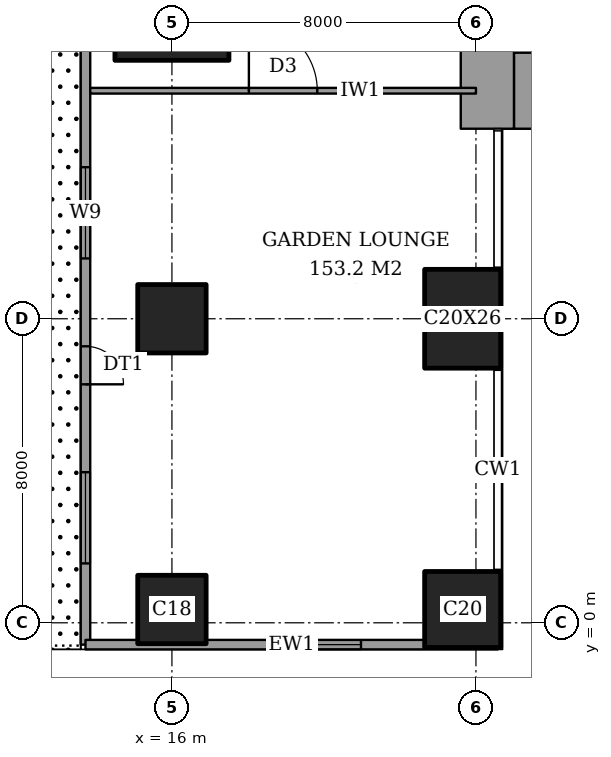
"""IFC4 building model, lengths in metres.
Left out: names, types, materials, properties, quantities, classifications, styles, units other than length and angle.
Written with IfcOpenShell. Run it as: python <this file> out.ifc"""

import sys

from ifc_helpers import new_model, si_unit, direction, frame, frame_2d, origin, origin_2d, place, context, subcontext, project, spatial, rectangle, extrude, element, fill, save


model = new_model("IFC4")
c1 = context("Model", 3, precision=1e-05, world=origin(), true_north=direction((0.0, 1.0)))
c2 = subcontext(c1, "Body", "Model", "MODEL_VIEW")
j1 = project(units=[si_unit("LENGTHUNIT", "METRE"), si_unit("PLANEANGLEUNIT", "RADIAN")], contexts=[c1])
p1 = place(None, origin())
s1 = spatial("IfcSite", under=j1, at=p1, CompositionType="ELEMENT")
p2 = place(p1, origin())
s2 = spatial("IfcBuilding", under=s1, at=p2, CompositionType="ELEMENT")
p3 = place(p2, frame((0.0, 0.0, 221.8)))
s3 = spatial("IfcBuildingStorey", under=s2, at=p3, CompositionType="ELEMENT", Elevation=221.8)
for number, where, z_axis, x_axis in (
    (1, (16.0, 0.35, 0.0), (0.0, 0.0, 1.0), (1.0, 0.0, 0.0)),
    (2, (16.0, 8.0, 0.0), (0.0, 0.0, 1.0), (1.0, 0.0, 0.0)),
):
    element("IfcColumn", number, at=place(p3, frame(where, z_axis=z_axis, x_axis=x_axis)), inside=s3, PredefinedType="COLUMN", context=c2, shape_type="SweptSolid", body=[
        extrude(rectangle(XDim=1.8, YDim=1.8, at=origin_2d()), origin(), (0.0, 0.0, 1.0), 3.6),
    ])
p4 = place(p3, frame((16.0, 16.0, 0.0), z_axis=(0.0, 0.0, 1.0), x_axis=(1.0, 0.0, 0.0)))
e3 = element("IfcColumn", 3, at=p4, inside=s3, PredefinedType="COLUMN", context=c2, shape_type="SweptSolid", body=[
    extrude(rectangle(XDim=3.0, YDim=2.4, at=origin_2d()), origin(), (0.0, 0.0, 1.0), 3.6),
])
p5 = place(p3, frame((23.65, 0.35, 0.0), z_axis=(0.0, 0.0, 1.0), x_axis=(1.0, 0.0, 0.0)))
e4 = element("IfcColumn", 4, at=p5, inside=s3, PredefinedType="COLUMN", context=c2, shape_type="SweptSolid", body=[
    extrude(rectangle(XDim=2.0, YDim=2.0, at=origin_2d()), origin(), (0.0, 0.0, 1.0), 3.6),
])
p6 = place(p3, frame((23.65, 8.0, 0.0), z_axis=(0.0, 0.0, 1.0), x_axis=(1.0, 0.0, 0.0)))
e5 = element("IfcColumn", 5, at=p6, inside=s3, PredefinedType="COLUMN", context=c2, shape_type="SweptSolid", body=[
    extrude(rectangle(XDim=2.0, YDim=2.6, at=origin_2d()), origin(), (0.0, 0.0, 1.0), 3.6),
])
p7 = place(p3, frame((25.0, 14.0, 0.0), z_axis=(0.0, 0.0, 1.0), x_axis=(1.0, 0.0, 0.0)))
e6 = element("IfcWall", 6, at=p7, inside=s3, PredefinedType="SHEAR", context=c2, shape_type="SweptSolid", body=[
    extrude(rectangle(XDim=3.15, YDim=2.0, at=frame_2d((1.575, 0.0))), origin(), (0.0, 0.0, 1.0), 3.6),
])
p8 = place(p3, frame((24.3, 13.0, 0.0), z_axis=(0.0, 0.0, 1.0), x_axis=(0.0, 1.0, 0.0)))
e7 = element("IfcWall", 7, at=p8, inside=s3, PredefinedType="SHEAR", context=c2, shape_type="SweptSolid", body=[
    extrude(rectangle(XDim=10.15, YDim=1.4, at=frame_2d((5.075, 0.0))), origin(), (0.0, 0.0, 1.0), 3.6),
])
p9 = place(p3, frame((13.725, 48.575, 0.0), z_axis=(0.0, 0.0, 1.0), x_axis=(0.0, -1.0, 0.0)))
e8 = element("IfcWall", 8, at=p9, inside=s3, PredefinedType="SOLIDWALL", context=c2, shape_type="SweptSolid", body=[
    extrude(rectangle(XDim=49.15, YDim=0.25, at=frame_2d((24.575, 0.0))), origin(), (0.0, 0.0, 1.0), 3.6),
])
p10 = place(p9, frame((7.85, 0.0, 0.0)))
e9 = element("IfcOpeningElement", 9, at=p10, cuts=e8, PredefinedType="OPENING", context=c2, shape_type="SweptSolid", body=[
    extrude(rectangle(XDim=1.0, YDim=2.4, at=frame_2d((0.5, 1.2))), frame((0.0, 0.135, 0.0), z_axis=(0.0, -1.0, 0.0), x_axis=(1.0, 0.0, 0.0)), (0.0, 0.0, 1.0), 0.27),
])
p11 = place(p9, frame((0.931, 0.0, 0.2)))
e10 = element("IfcOpeningElement", 10, at=p11, cuts=e8, PredefinedType="OPENING", context=c2, shape_type="SweptSolid", body=[
    extrude(rectangle(XDim=2.4, YDim=2.4, at=frame_2d((1.2, 1.2))), frame((0.0, 0.135, 0.0), z_axis=(0.0, -1.0, 0.0), x_axis=(1.0, 0.0, 0.0)), (0.0, 0.0, 1.0), 0.27),
])
p12 = place(p9, frame((4.344, 0.0, 0.2)))
e11 = element("IfcOpeningElement", 11, at=p12, cuts=e8, PredefinedType="OPENING", context=c2, shape_type="SweptSolid", body=[
    extrude(rectangle(XDim=2.4, YDim=2.4, at=frame_2d((1.2, 1.2))), frame((0.0, 0.135, 0.0), z_axis=(0.0, -1.0, 0.0), x_axis=(1.0, 0.0, 0.0)), (0.0, 0.0, 1.0), 0.27),
])
p13 = place(p9, frame((10.663, 0.0, 0.2)))
e12 = element("IfcOpeningElement", 12, at=p13, cuts=e8, PredefinedType="OPENING", context=c2, shape_type="SweptSolid", body=[
    extrude(rectangle(XDim=2.4, YDim=2.4, at=frame_2d((1.2, 1.2))), frame((0.0, 0.135, 0.0), z_axis=(0.0, -1.0, 0.0), x_axis=(1.0, 0.0, 0.0)), (0.0, 0.0, 1.0), 0.27),
])
p14 = place(p9, frame((16.375, 0.0, 0.2)))
e13 = element("IfcOpeningElement", 13, at=p14, cuts=e8, PredefinedType="OPENING", context=c2, shape_type="SweptSolid", body=[
    extrude(rectangle(XDim=2.4, YDim=2.4, at=frame_2d((1.2, 1.2))), frame((0.0, 0.135, 0.0), z_axis=(0.0, -1.0, 0.0), x_axis=(1.0, 0.0, 0.0)), (0.0, 0.0, 1.0), 0.27),
])
p15 = place(p9, frame((20.975, 0.0, 0.2)))
e14 = element("IfcOpeningElement", 14, at=p15, cuts=e8, PredefinedType="OPENING", context=c2, shape_type="SweptSolid", body=[
    extrude(rectangle(XDim=1.2, YDim=2.4, at=frame_2d((0.6, 1.2))), frame((0.0, 0.135, 0.0), z_axis=(0.0, -1.0, 0.0), x_axis=(1.0, 0.0, 0.0)), (0.0, 0.0, 1.0), 0.27),
])
p16 = place(p9, frame((22.975, 0.0, 0.2)))
e15 = element("IfcOpeningElement", 15, at=p16, cuts=e8, PredefinedType="OPENING", context=c2, shape_type="SweptSolid", body=[
    extrude(rectangle(XDim=1.2, YDim=2.4, at=frame_2d((0.6, 1.2))), frame((0.0, 0.135, 0.0), z_axis=(0.0, -1.0, 0.0), x_axis=(1.0, 0.0, 0.0)), (0.0, 0.0, 1.0), 0.27),
])
p17 = place(p9, frame((25.375, 0.0, 0.2)))
e16 = element("IfcOpeningElement", 16, at=p17, cuts=e8, PredefinedType="OPENING", context=c2, shape_type="SweptSolid", body=[
    extrude(rectangle(XDim=2.4, YDim=2.4, at=frame_2d((1.2, 1.2))), frame((0.0, 0.135, 0.0), z_axis=(0.0, -1.0, 0.0), x_axis=(1.0, 0.0, 0.0)), (0.0, 0.0, 1.0), 0.27),
])
p18 = place(p9, frame((30.375, 0.0, 0.2)))
e17 = element("IfcOpeningElement", 17, at=p18, cuts=e8, PredefinedType="OPENING", context=c2, shape_type="SweptSolid", body=[
    extrude(rectangle(XDim=2.4, YDim=2.4, at=frame_2d((1.2, 1.2))), frame((0.0, 0.135, 0.0), z_axis=(0.0, -1.0, 0.0), x_axis=(1.0, 0.0, 0.0)), (0.0, 0.0, 1.0), 0.27),
])
p19 = place(p9, frame((41.3, 0.0, 0.0)))
e18 = element("IfcOpeningElement", 18, at=p19, cuts=e8, PredefinedType="OPENING", context=c2, shape_type="SweptSolid", body=[
    extrude(rectangle(XDim=1.0, YDim=2.4, at=frame_2d((0.5, 1.2))), frame((0.0, 0.135, 0.0), z_axis=(0.0, -1.0, 0.0), x_axis=(1.0, 0.0, 0.0)), (0.0, 0.0, 1.0), 0.27),
])
p20 = place(p9, frame((36.587, 0.0, 0.2)))
e19 = element("IfcOpeningElement", 19, at=p20, cuts=e8, PredefinedType="OPENING", context=c2, shape_type="SweptSolid", body=[
    extrude(rectangle(XDim=2.4, YDim=2.4, at=frame_2d((1.2, 1.2))), frame((0.0, 0.135, 0.0), z_axis=(0.0, -1.0, 0.0), x_axis=(1.0, 0.0, 0.0)), (0.0, 0.0, 1.0), 0.27),
])
p21 = place(p9, frame((44.613, 0.0, 0.2)))
e20 = element("IfcOpeningElement", 20, at=p21, cuts=e8, PredefinedType="OPENING", context=c2, shape_type="SweptSolid", body=[
    extrude(rectangle(XDim=2.4, YDim=2.4, at=frame_2d((1.2, 1.2))), frame((0.0, 0.135, 0.0), z_axis=(0.0, -1.0, 0.0), x_axis=(1.0, 0.0, 0.0)), (0.0, 0.0, 1.0), 0.27),
])
p22 = place(p3, frame((13.725, -0.575, 0.0), z_axis=(0.0, 0.0, 1.0), x_axis=(1.0, 0.0, 0.0)))
e21 = element("IfcWall", 21, at=p22, inside=s3, PredefinedType="SOLIDWALL", context=c2, shape_type="SweptSolid", body=[
    extrude(rectangle(XDim=10.85, YDim=0.25, at=frame_2d((5.425, 0.0))), origin(), (0.0, 0.0, 1.0), 3.6),
])
p23 = place(p22, frame((4.85, 0.0, 0.2)))
e22 = element("IfcOpeningElement", 22, at=p23, cuts=e21, PredefinedType="OPENING", context=c2, shape_type="SweptSolid", body=[
    extrude(rectangle(XDim=2.4, YDim=2.4, at=frame_2d((1.2, 1.2))), frame((0.0, 0.135, 0.0), z_axis=(0.0, -1.0, 0.0), x_axis=(1.0, 0.0, 0.0)), (0.0, 0.0, 1.0), 0.27),
])
p24 = place(p3, frame((13.85, 14.0, 0.0), z_axis=(0.0, 0.0, 1.0), x_axis=(1.0, 0.0, 0.0)))
e23 = element("IfcWall", 23, at=p24, inside=s3, PredefinedType="PARTITIONING", context=c2, shape_type="SweptSolid", body=[
    extrude(rectangle(XDim=10.15, YDim=0.15, at=frame_2d((5.075, 0.0))), origin(), (0.0, 0.0, 1.0), 3.25),
])
p25 = place(p24, frame((4.175, 0.0, 0.0)))
e24 = element("IfcOpeningElement", 24, at=p25, cuts=e23, PredefinedType="OPENING", context=c2, shape_type="SweptSolid", body=[
    extrude(rectangle(XDim=1.8, YDim=2.1, at=frame_2d((0.9, 1.05))), frame((0.0, 0.085, 0.0), z_axis=(0.0, -1.0, 0.0), x_axis=(1.0, 0.0, 0.0)), (0.0, 0.0, 1.0), 0.17),
])
p26 = place(p19, origin())
e25 = element("IfcDoor", 25, at=p26, inside=s3, OperationType="SINGLE_SWING_LEFT", PredefinedType="DOOR", context=c2, shape_type="SweptSolid", body=[
    extrude(rectangle(XDim=1.0, YDim=2.4, at=frame_2d((0.5, 1.2))), frame((0.0, 0.025, 0.0), z_axis=(0.0, -1.0, 0.0), x_axis=(1.0, 0.0, 0.0)), (0.0, 0.0, 1.0), 0.05),
])
fill(e18, e25)
p27 = place(p20, origin())
e26 = element("IfcWindow", 26, at=p27, inside=s3, PartitioningType="SINGLE_PANEL", PredefinedType="WINDOW", context=c2, shape_type="SweptSolid", body=[
    extrude(rectangle(XDim=2.4, YDim=2.4, at=frame_2d((1.2, 1.2))), frame((0.0, 0.03, 0.0), z_axis=(0.0, -1.0, 0.0), x_axis=(1.0, 0.0, 0.0)), (0.0, 0.0, 1.0), 0.06),
])
fill(e19, e26)
p28 = place(p21, origin())
e27 = element("IfcWindow", 27, at=p28, inside=s3, PartitioningType="SINGLE_PANEL", PredefinedType="WINDOW", context=c2, shape_type="SweptSolid", body=[
    extrude(rectangle(XDim=2.4, YDim=2.4, at=frame_2d((1.2, 1.2))), frame((0.0, 0.03, 0.0), z_axis=(0.0, -1.0, 0.0), x_axis=(1.0, 0.0, 0.0)), (0.0, 0.0, 1.0), 0.06),
])
fill(e20, e27)
p29 = place(p23, origin())
e28 = element("IfcWindow", 28, at=p29, inside=s3, PartitioningType="SINGLE_PANEL", PredefinedType="WINDOW", context=c2, shape_type="SweptSolid", body=[
    extrude(rectangle(XDim=2.4, YDim=2.4, at=frame_2d((1.2, 1.2))), frame((0.0, 0.03, 0.0), z_axis=(0.0, -1.0, 0.0), x_axis=(1.0, 0.0, 0.0)), (0.0, 0.0, 1.0), 0.06),
])
fill(e22, e28)
p30 = place(p25, origin())
e29 = element("IfcDoor", 29, at=p30, inside=s3, OperationType="DOUBLE_DOOR_DOUBLE_SWING", PredefinedType="DOOR", context=c2, shape_type="SweptSolid", body=[
    extrude(rectangle(XDim=1.8, YDim=2.1, at=frame_2d((0.9, 1.05))), frame((0.0, 0.025, 0.0), z_axis=(0.0, -1.0, 0.0), x_axis=(1.0, 0.0, 0.0)), (0.0, 0.0, 1.0), 0.05),
])
fill(e24, e29)
save(model, sys.argv[1])
